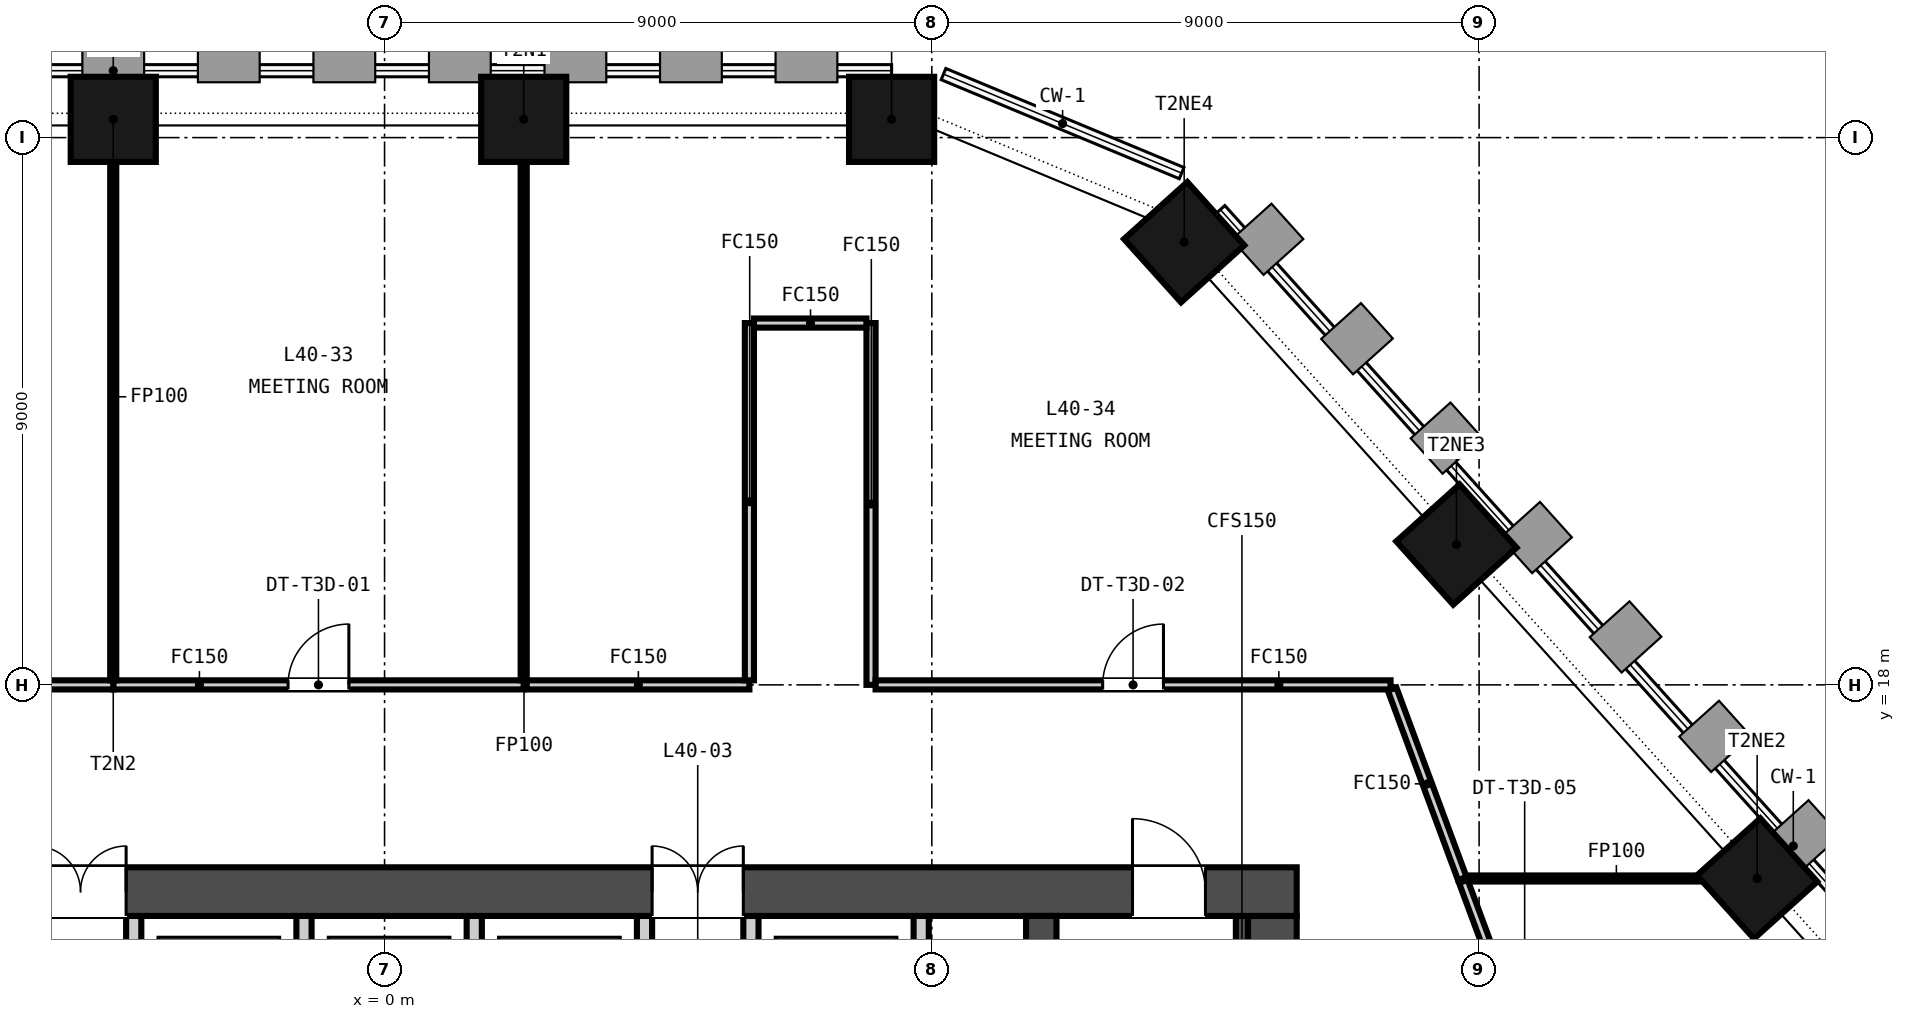
"""IFC4 building model, lengths in metres.
Left out: names, types, materials, properties, quantities, classifications, styles, units other than length and angle.
Written with IfcOpenShell. Run it as: python <this file> out.ifc"""

import sys

from ifc_helpers import new_model, si_unit, direction, frame, frame_2d, origin, origin_2d, place, context, subcontext, project, spatial, rectangle, extrude, element, fill, save


model = new_model("IFC4")
c1 = context("Model", 3, precision=1e-05, world=origin(), true_north=direction((0.0, 1.0)))
c2 = subcontext(c1, "Body", "Model", "MODEL_VIEW")
j1 = project(units=[si_unit("LENGTHUNIT", "METRE"), si_unit("PLANEANGLEUNIT", "RADIAN")], contexts=[c1])
p1 = place(None, origin())
s1 = spatial("IfcSite", under=j1, at=p1, CompositionType="ELEMENT")
p2 = place(p1, origin())
s2 = spatial("IfcBuilding", under=s1, at=p2, CompositionType="ELEMENT")
p3 = place(p2, frame((0.0, 0.0, 162.65)))
s3 = spatial("IfcBuildingStorey", under=s2, at=p3, CompositionType="ELEMENT", Elevation=162.65)
p4 = place(p3, frame((-15.0, 14.6, -0.15), z_axis=(0.0, 0.0, 1.0), x_axis=(1.0, 0.0, 0.0)))
e1 = element("IfcWall", 1, at=p4, inside=s3, PredefinedType="SOLIDWALL", context=c2, shape_type="SweptSolid", body=[
    extrude(rectangle(XDim=30.0, YDim=0.8, at=frame_2d((15.0, 0.0))), origin(), (0.0, 0.0, 1.0), 3.5),
])
p5 = place(p4, frame((9.25, 0.0, 0.15)))
e2 = element("IfcOpeningElement", 2, at=p5, cuts=e1, PredefinedType="OPENING", context=c2, shape_type="SweptSolid", body=[
    extrude(rectangle(XDim=1.5, YDim=2.1, at=frame_2d((0.75, 1.05))), frame((0.0, 0.41, 0.0), z_axis=(0.0, -1.0, 0.0), x_axis=(1.0, 0.0, 0.0)), (0.0, 0.0, 1.0), 0.82),
])
p6 = place(p4, frame((19.4, 0.0, 0.15)))
e3 = element("IfcOpeningElement", 3, at=p6, cuts=e1, PredefinedType="OPENING", context=c2, shape_type="SweptSolid", body=[
    extrude(rectangle(XDim=1.5, YDim=2.1, at=frame_2d((0.75, 1.05))), frame((0.0, 0.41, 0.0), z_axis=(0.0, -1.0, 0.0), x_axis=(1.0, 0.0, 0.0)), (0.0, 0.0, 1.0), 0.82),
])
p7 = place(p4, frame((1.5, 0.0, 0.15)))
e4 = element("IfcOpeningElement", 4, at=p7, cuts=e1, PredefinedType="OPENING", context=c2, shape_type="SweptSolid", body=[
    extrude(rectangle(XDim=1.2, YDim=2.1, at=frame_2d((0.6, 1.05))), frame((0.0, 0.41, 0.0), z_axis=(0.0, -1.0, 0.0), x_axis=(1.0, 0.0, 0.0)), (0.0, 0.0, 1.0), 0.82),
])
p8 = place(p4, frame((27.3, 0.0, 0.15)))
e5 = element("IfcOpeningElement", 5, at=p8, cuts=e1, PredefinedType="OPENING", context=c2, shape_type="SweptSolid", body=[
    extrude(rectangle(XDim=1.2, YDim=2.1, at=frame_2d((0.6, 1.05))), frame((0.0, 0.41, 0.0), z_axis=(0.0, -1.0, 0.0), x_axis=(1.0, 0.0, 0.0)), (0.0, 0.0, 1.0), 0.82),
])
p9 = place(p3, frame((14.6, 0.8, -0.15), z_axis=(0.0, 0.0, 1.0), x_axis=(0.0, 1.0, 0.0)))
e6 = element("IfcWall", 6, at=p9, inside=s3, PredefinedType="SOLIDWALL", context=c2, shape_type="SweptSolid", body=[
    extrude(rectangle(XDim=13.4, YDim=0.8, at=frame_2d((6.7, 0.0))), origin(), (0.0, 0.0, 1.0), 3.5),
])
p10 = place(p3, frame((10.8, 0.8, -0.15), z_axis=(0.0, 0.0, 1.0), x_axis=(0.0, 1.0, 0.0)))
e7 = element("IfcWall", 7, at=p10, inside=s3, PredefinedType="SOLIDWALL", context=c2, shape_type="SweptSolid", body=[
    extrude(rectangle(XDim=13.4, YDim=0.5, at=frame_2d((6.7, 0.0))), origin(), (0.0, 0.0, 1.0), 3.5),
])
for number, where, z_axis, x_axis in (
    (8, (8.339, 27.3, -0.15), (0.0, 0.0, 1.0), (-1.0, 0.0, 0.0)),
    (9, (2.288, 27.3, -0.15), (0.0, 0.0, 1.0), (-1.0, 0.0, 0.0)),
    (10, (-4.462, 27.3, -0.15), (0.0, 0.0, 1.0), (-1.0, 0.0, 0.0)),
    (11, (22.573, 14.816, -0.15), (0.0, 0.0, 1.0), (-0.669, 0.743, 0.0)),
    (12, (17.627, 20.308, -0.15), (0.0, 0.0, 1.0), (-0.669, 0.743, 0.0)),
    (13, (13.15, 25.28, -0.15), (0.0, 0.0, 1.0), (-0.669, 0.743, 0.0)),
):
    element("IfcColumn", number, at=place(p3, frame(where, z_axis=z_axis, x_axis=x_axis)), inside=s3, PredefinedType="COLUMN", context=c2, shape_type="SweptSolid", body=[
        extrude(rectangle(XDim=1.4, YDim=1.4, at=origin_2d()), origin(), (0.0, 0.0, 1.0), 3.5),
    ])
for number, where, z_axis, x_axis in (
    (14, (-4.125, 11.3, 0.0), (0.0, 0.0, 1.0), (0.0, 1.0, 0.0)),
    (15, (-1.325, 11.3, 0.0), (0.0, 0.0, 1.0), (0.0, 1.0, 0.0)),
    (16, (1.475, 11.3, 0.0), (0.0, 0.0, 1.0), (0.0, 1.0, 0.0)),
    (17, (4.275, 11.3, 0.0), (0.0, 0.0, 1.0), (0.0, 1.0, 0.0)),
    (18, (6.025, 11.3, 0.0), (0.0, 0.0, 1.0), (0.0, 1.0, 0.0)),
    (19, (8.825, 11.3, 0.0), (0.0, 0.0, 1.0), (0.0, 1.0, 0.0)),
):
    element("IfcWall", number, at=place(p3, frame(where, z_axis=z_axis, x_axis=x_axis)), inside=s3, PredefinedType="PARTITIONING", context=c2, shape_type="SweptSolid", body=[
        extrude(rectangle(XDim=2.9, YDim=0.25, at=frame_2d((1.45, 0.0))), origin(), (0.0, 0.0, 1.0), 3.35),
    ])
p11 = place(p3, frame((14.1, 0.8, 0.0), z_axis=(0.0, 0.0, 1.0), x_axis=(0.0, 1.0, 0.0)))
e20 = element("IfcWall", 20, at=p11, inside=s3, PredefinedType="SOLIDWALL", context=c2, shape_type="SweptSolid", body=[
    extrude(rectangle(XDim=13.4, YDim=0.2, at=frame_2d((6.7, 0.0))), origin(), (0.0, 0.0, 1.0), 3.35),
])
p12 = place(p3, frame((8.0, 23.95, 0.0), z_axis=(0.0, 0.0, 1.0), x_axis=(0.0, -1.0, 0.0)))
e21 = element("IfcWall", 21, at=p12, inside=s3, PredefinedType="PARTITIONING", context=c2, shape_type="SweptSolid", body=[
    extrude(rectangle(XDim=5.95, YDim=0.15, at=frame_2d((2.975, 0.0))), origin(), (0.0, 0.0, 1.0), 2.591),
])
p13 = place(p3, frame((-4.462, 18.0, 0.0), z_axis=(0.0, 0.0, 1.0), x_axis=(1.0, 0.0, 0.0)))
e22 = element("IfcWall", 22, at=p13, inside=s3, PredefinedType="PARTITIONING", context=c2, shape_type="SweptSolid", body=[
    extrude(rectangle(XDim=6.75, YDim=0.15, at=frame_2d((3.375, 0.0))), origin(), (0.0, 0.0, 1.0), 2.591),
])
p14 = place(p13, frame((2.875, 0.0, 0.0)))
e23 = element("IfcOpeningElement", 23, at=p14, cuts=e22, PredefinedType="OPENING", context=c2, shape_type="SweptSolid", body=[
    extrude(rectangle(XDim=1.0, YDim=2.1, at=frame_2d((0.5, 1.05))), frame((0.0, 0.085, 0.0), z_axis=(0.0, -1.0, 0.0), x_axis=(1.0, 0.0, 0.0)), (0.0, 0.0, 1.0), 0.17),
])
p15 = place(p3, frame((2.288, 18.075, 0.0), z_axis=(0.0, 0.0, 1.0), x_axis=(0.0, 1.0, 0.0)))
e24 = element("IfcWall", 24, at=p15, inside=s3, PredefinedType="PARTITIONING", context=c2, shape_type="SweptSolid", body=[
    extrude(rectangle(XDim=9.325, YDim=0.1, at=frame_2d((4.663, 0.0))), origin(), (0.0, 0.0, 1.0), 2.591),
])
p16 = place(p3, frame((2.338, 18.0, 0.0), z_axis=(0.0, 0.0, 1.0), x_axis=(1.0, 0.0, 0.0)))
e25 = element("IfcWall", 25, at=p16, inside=s3, PredefinedType="PARTITIONING", context=c2, shape_type="SweptSolid", body=[
    extrude(rectangle(XDim=3.662, YDim=0.15, at=frame_2d((1.831, 0.0))), origin(), (0.0, 0.0, 1.0), 2.591),
])
p17 = place(p3, frame((6.0, 18.075, 0.0), z_axis=(0.0, 0.0, 1.0), x_axis=(0.0, 1.0, 0.0)))
e26 = element("IfcWall", 26, at=p17, inside=s3, PredefinedType="PARTITIONING", context=c2, shape_type="SweptSolid", body=[
    extrude(rectangle(XDim=5.875, YDim=0.15, at=frame_2d((2.938, 0.0))), origin(), (0.0, 0.0, 1.0), 2.591),
])
p18 = place(p3, frame((6.075, 23.95, 0.0), z_axis=(0.0, 0.0, 1.0), x_axis=(1.0, 0.0, 0.0)))
e27 = element("IfcWall", 27, at=p18, inside=s3, PredefinedType="PARTITIONING", context=c2, shape_type="SweptSolid", body=[
    extrude(rectangle(XDim=1.85, YDim=0.15, at=frame_2d((0.925, 0.0))), origin(), (0.0, 0.0, 1.0), 2.591),
])
p19 = place(p3, frame((8.075, 18.0, 0.0), z_axis=(0.0, 0.0, 1.0), x_axis=(1.0, 0.0, 0.0)))
e28 = element("IfcWall", 28, at=p19, inside=s3, PredefinedType="PARTITIONING", context=c2, shape_type="SweptSolid", body=[
    extrude(rectangle(XDim=8.469, YDim=0.15, at=frame_2d((4.234, 0.0))), origin(), (0.0, 0.0, 1.0), 2.591),
])
p20 = place(p19, frame((3.735, 0.0, 0.0)))
e29 = element("IfcOpeningElement", 29, at=p20, cuts=e28, PredefinedType="OPENING", context=c2, shape_type="SweptSolid", body=[
    extrude(rectangle(XDim=1.0, YDim=2.1, at=frame_2d((0.5, 1.05))), frame((0.0, 0.085, 0.0), z_axis=(0.0, -1.0, 0.0), x_axis=(1.0, 0.0, 0.0)), (0.0, 0.0, 1.0), 0.17),
])
p21 = place(p3, frame((16.57, 17.93, 0.0), z_axis=(0.0, 0.0, 1.0), x_axis=(0.34720419289, -0.937789554452, 0.0)))
e30 = element("IfcWall", 30, at=p21, inside=s3, PredefinedType="PARTITIONING", context=c2, shape_type="SweptSolid", body=[
    extrude(rectangle(XDim=3.32, YDim=0.15, at=frame_2d((1.66, 0.0))), origin(), (0.0, 0.0, 1.0), 2.591),
])
p22 = place(p3, frame((17.798, 14.816, 0.0), z_axis=(0.0, 0.0, 1.0), x_axis=(1.0, 0.0, 0.0)))
e31 = element("IfcWall", 31, at=p22, inside=s3, PredefinedType="PARTITIONING", context=c2, shape_type="SweptSolid", body=[
    extrude(rectangle(XDim=4.909, YDim=0.1, at=frame_2d((2.455, 0.0))), origin(), (0.0, 0.0, 1.0), 2.591),
])
p23 = place(p3, frame((-16.469, 18.0, 0.0), z_axis=(0.0, 0.0, 1.0), x_axis=(1.0, 0.0, 0.0)))
e32 = element("IfcWall", 32, at=p23, inside=s3, PredefinedType="PARTITIONING", context=c2, shape_type="SweptSolid", body=[
    extrude(rectangle(XDim=12.007, YDim=0.15, at=frame_2d((6.003, 0.0))), origin(), (0.0, 0.0, 1.0), 2.591),
])
p24 = place(p23, frame((5.104, 0.0, 0.0)))
e33 = element("IfcOpeningElement", 33, at=p24, cuts=e32, PredefinedType="OPENING", context=c2, shape_type="SweptSolid", body=[
    extrude(rectangle(XDim=1.8, YDim=2.1, at=frame_2d((0.9, 1.05))), frame((0.0, 0.085, 0.0), z_axis=(0.0, -1.0, 0.0), x_axis=(1.0, 0.0, 0.0)), (0.0, 0.0, 1.0), 0.17),
])
p25 = place(p3, frame((-4.462, 18.075, 0.0), z_axis=(0.0, 0.0, 1.0), x_axis=(0.0, 1.0, 0.0)))
e34 = element("IfcWall", 34, at=p25, inside=s3, PredefinedType="PARTITIONING", context=c2, shape_type="SweptSolid", body=[
    extrude(rectangle(XDim=9.325, YDim=0.1, at=frame_2d((4.663, 0.0))), origin(), (0.0, 0.0, 1.0), 2.591),
])
p26 = place(p3, frame((17.74, 14.769, 0.0), z_axis=(0.0, 0.0, 1.0), x_axis=(0.347393763434, -0.937719346674, 0.0)))
e35 = element("IfcWall", 35, at=p26, inside=s3, PredefinedType="PARTITIONING", context=c2, shape_type="SweptSolid", body=[
    extrude(rectangle(XDim=5.808, YDim=0.15, at=frame_2d((2.904, 0.0))), origin(), (0.0, 0.0, 1.0), 2.591),
])
p27 = place(p26, frame((2.404, 0.0, 0.0)))
e36 = element("IfcOpeningElement", 36, at=p27, cuts=e35, PredefinedType="OPENING", context=c2, shape_type="SweptSolid", body=[
    extrude(rectangle(XDim=1.0, YDim=2.1, at=frame_2d((0.5, 1.05))), frame((0.0, 0.085, 0.0), z_axis=(0.0, -1.0, 0.0), x_axis=(1.0, 0.0, 0.0)), (0.0, 0.0, 1.0), 0.17),
])
p28 = place(p5, origin())
e37 = element("IfcDoor", 37, at=p28, inside=s3, OperationType="DOUBLE_DOOR_SINGLE_SWING", PredefinedType="DOOR", context=c2, shape_type="SweptSolid", body=[
    extrude(rectangle(XDim=1.5, YDim=2.1, at=frame_2d((0.75, 1.05))), frame((0.0, 0.025, 0.0), z_axis=(0.0, -1.0, 0.0), x_axis=(1.0, 0.0, 0.0)), (0.0, 0.0, 1.0), 0.05),
])
fill(e2, e37)
p29 = place(p6, origin())
e38 = element("IfcDoor", 38, at=p29, inside=s3, OperationType="DOUBLE_DOOR_SINGLE_SWING", PredefinedType="DOOR", context=c2, shape_type="SweptSolid", body=[
    extrude(rectangle(XDim=1.5, YDim=2.1, at=frame_2d((0.75, 1.05))), frame((0.0, 0.025, 0.0), z_axis=(0.0, -1.0, 0.0), x_axis=(1.0, 0.0, 0.0)), (0.0, 0.0, 1.0), 0.05),
])
fill(e3, e38)
p30 = place(p8, origin())
e39 = element("IfcDoor", 39, at=p30, inside=s3, OperationType="SINGLE_SWING_LEFT", PredefinedType="DOOR", context=c2, shape_type="SweptSolid", body=[
    extrude(rectangle(XDim=1.2, YDim=2.1, at=frame_2d((0.6, 1.05))), frame((0.0, 0.025, 0.0), z_axis=(0.0, -1.0, 0.0), x_axis=(1.0, 0.0, 0.0)), (0.0, 0.0, 1.0), 0.05),
])
fill(e5, e39)
p31 = place(p14, origin())
e40 = element("IfcDoor", 40, at=p31, inside=s3, OperationType="SINGLE_SWING_RIGHT", PredefinedType="DOOR", context=c2, shape_type="SweptSolid", body=[
    extrude(rectangle(XDim=1.0, YDim=2.1, at=frame_2d((0.5, 1.05))), frame((0.0, 0.025, 0.0), z_axis=(0.0, -1.0, 0.0), x_axis=(1.0, 0.0, 0.0)), (0.0, 0.0, 1.0), 0.05),
])
fill(e23, e40)
p32 = place(p20, origin())
e41 = element("IfcDoor", 41, at=p32, inside=s3, OperationType="SINGLE_SWING_RIGHT", PredefinedType="DOOR", context=c2, shape_type="SweptSolid", body=[
    extrude(rectangle(XDim=1.0, YDim=2.1, at=frame_2d((0.5, 1.05))), frame((0.0, 0.025, 0.0), z_axis=(0.0, -1.0, 0.0), x_axis=(1.0, 0.0, 0.0)), (0.0, 0.0, 1.0), 0.05),
])
fill(e29, e41)
save(model, sys.argv[1])
